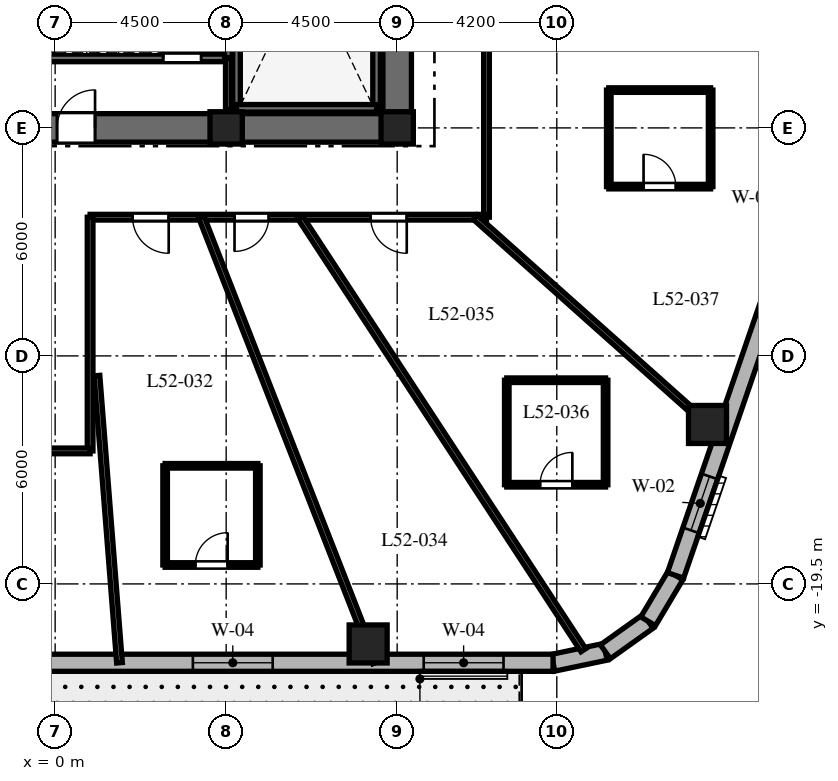
"""IFC4 building model, lengths in metres.
Left out: names, types, materials, properties, quantities, classifications, styles, units other than length and angle.
Written with IfcOpenShell. Run it as: python <this file> out.ifc"""

import sys

from ifc_helpers import new_model, si_unit, direction, frame, frame_2d, origin, origin_2d, place, context, subcontext, project, spatial, rectangle, extrude, element, fill, save


model = new_model("IFC4")
c1 = context("Model", 3, precision=1e-05, world=origin(), true_north=direction((0.0, 1.0)))
c2 = subcontext(c1, "Body", "Model", "MODEL_VIEW")
j1 = project(units=[si_unit("LENGTHUNIT", "METRE"), si_unit("PLANEANGLEUNIT", "RADIAN")], contexts=[c1])
p1 = place(None, origin())
s1 = spatial("IfcSite", under=j1, at=p1, CompositionType="ELEMENT")
p2 = place(p1, origin())
s2 = spatial("IfcBuilding", under=s1, at=p2, CompositionType="ELEMENT")
p3 = place(p2, frame((0.0, 0.0, 210.3)))
s3 = spatial("IfcBuildingStorey", under=s2, at=p3, CompositionType="ELEMENT", Elevation=210.3)
p4 = place(p3, frame((-9.375, -7.5, 0.0), z_axis=(0.0, 0.0, 1.0), x_axis=(1.0, 0.0, 0.0)))
e1 = element("IfcWall", 1, at=p4, inside=s3, PredefinedType="SHEAR", context=c2, shape_type="SweptSolid", body=[
    extrude(rectangle(XDim=18.75, YDim=0.75, at=frame_2d((9.375, 0.0))), origin(), (0.0, 0.0, 1.0), 3.8),
])
p5 = place(p4, frame((9.425, 0.0, 0.0)))
e2 = element("IfcOpeningElement", 2, at=p5, cuts=e1, PredefinedType="OPENING", context=c2, shape_type="SweptSolid", body=[
    extrude(rectangle(XDim=1.0, YDim=2.15, at=frame_2d((0.5, 1.075))), frame((0.0, 0.385, 0.0), z_axis=(0.0, -1.0, 0.0), x_axis=(1.0, 0.0, 0.0)), (0.0, 0.0, 1.0), 0.77),
])
p6 = place(p3, frame((9.0, -7.125, 0.0), z_axis=(0.0, 0.0, 1.0), x_axis=(0.0, 1.0, 0.0)))
e3 = element("IfcWall", 3, at=p6, inside=s3, PredefinedType="SHEAR", context=c2, shape_type="SweptSolid", body=[
    extrude(rectangle(XDim=14.25, YDim=0.75, at=frame_2d((7.125, 0.0))), origin(), (0.0, 0.0, 1.0), 3.8),
])
p7 = place(p6, frame((10.25, 0.0, 0.0)))
e4 = element("IfcOpeningElement", 4, at=p7, cuts=e3, PredefinedType="OPENING", context=c2, shape_type="SweptSolid", body=[
    extrude(rectangle(XDim=1.05, YDim=2.15, at=frame_2d((0.525, 1.075))), frame((0.0, 0.385, 0.0), z_axis=(0.0, -1.0, 0.0), x_axis=(1.0, 0.0, 0.0)), (0.0, 0.0, 1.0), 0.77),
])
for number, where, z_axis, x_axis in (
    (5, (4.772, -6.985, 0.0), (0.0, 0.0, 1.0), (0.0, 1.0, 0.0)),
    (6, (8.458, -6.985, 0.0), (0.0, 0.0, 1.0), (0.0, 1.0, 0.0)),
):
    element("IfcWall", number, at=place(p3, frame(where, z_axis=z_axis, x_axis=x_axis)), inside=s3, PredefinedType="SHEAR", context=c2, shape_type="SweptSolid", body=[
        extrude(rectangle(XDim=9.143, YDim=0.2, at=frame_2d((4.572, 0.0))), origin(), (0.0, 0.0, 1.0), 3.8),
    ])
p8 = place(p3, frame((4.772, -6.985, 0.0), z_axis=(0.0, 0.0, 1.0), x_axis=(1.0, 0.0, 0.0)))
e7 = element("IfcWall", 7, at=p8, inside=s3, PredefinedType="SHEAR", context=c2, shape_type="SweptSolid", body=[
    extrude(rectangle(XDim=3.686, YDim=0.2, at=frame_2d((1.843, 0.0))), origin(), (0.0, 0.0, 1.0), 3.8),
])
p9 = place(p3, frame((-4.608, -5.658, 0.0), z_axis=(0.0, 0.0, 1.0), x_axis=(1.0, 0.0, 0.0)))
e8 = element("IfcWall", 8, at=p9, inside=s3, PredefinedType="SHEAR", context=c2, shape_type="SweptSolid", body=[
    extrude(rectangle(XDim=9.166, YDim=0.2, at=frame_2d((4.583, 0.0))), origin(), (0.0, 0.0, 1.0), 3.8),
])
p10 = place(p9, frame((7.45, 0.0, 0.0)))
e9 = element("IfcOpeningElement", 9, at=p10, cuts=e8, PredefinedType="OPENING", context=c2, shape_type="SweptSolid", body=[
    extrude(rectangle(XDim=1.0, YDim=2.15, at=frame_2d((0.5, 1.075))), frame((0.0, 0.11, 0.0), z_axis=(0.0, -1.0, 0.0), x_axis=(1.0, 0.0, 0.0)), (0.0, 0.0, 1.0), 0.22),
])
p11 = place(p3, frame((4.558, -5.658, 0.0), z_axis=(0.0, 0.0, 1.0), x_axis=(0.0, 1.0, 0.0)))
e10 = element("IfcWall", 10, at=p11, inside=s3, PredefinedType="SHEAR", context=c2, shape_type="SweptSolid", body=[
    extrude(rectangle(XDim=3.686, YDim=0.2, at=frame_2d((1.843, 0.0))), origin(), (0.0, 0.0, 1.0), 3.8),
])
for number, where, z_axis, x_axis in (
    (11, (4.5, -7.5, 0.0), (0.0, 0.0, 1.0), (1.0, 0.0, 0.0)),
    (12, (9.0, -7.5, 0.0), (0.0, 0.0, 1.0), (1.0, 0.0, 0.0)),
):
    element("IfcColumn", number, at=place(p3, frame(where, z_axis=z_axis, x_axis=x_axis)), inside=s3, PredefinedType="COLUMN", context=c2, shape_type="SweptSolid", body=[
        extrude(rectangle(XDim=0.85, YDim=0.85, at=origin_2d()), origin(), (0.0, 0.0, 1.0), 3.8),
    ])
for number, where, z_axis, x_axis in (
    (13, (8.236, -21.08, 0.0), (0.0, 0.0, 1.0), (1.0, 0.0, 0.0)),
    (14, (17.166, -15.304, 0.0), (0.0, 0.0, 1.0), (1.0, 0.0, 0.0)),
):
    element("IfcColumn", number, at=place(p3, frame(where, z_axis=z_axis, x_axis=x_axis)), inside=s3, PredefinedType="COLUMN", context=c2, shape_type="SweptSolid", body=[
        extrude(rectangle(XDim=1.0, YDim=1.0, at=origin_2d()), origin(), (0.0, 0.0, 1.0), 3.8),
    ])
p12 = place(p3, frame((13.102, -21.575, 0.0), z_axis=(0.0, 0.0, 1.0), x_axis=(0.978757421505, 0.205021730188, 0.0)))
e15 = element("IfcWall", 15, at=p12, inside=s3, PredefinedType="SOLIDWALL", context=c2, shape_type="SweptSolid", body=[
    extrude(rectangle(XDim=1.406, YDim=0.45, at=frame_2d((0.703, 0.0))), origin(), (0.0, 0.0, 1.0), 3.5),
])
p13 = place(p3, frame((14.478, -21.287, 0.0), z_axis=(0.0, 0.0, 1.0), x_axis=(0.813888518617, 0.58102106611, 0.0)))
e16 = element("IfcWall", 16, at=p13, inside=s3, PredefinedType="SOLIDWALL", context=c2, shape_type="SweptSolid", body=[
    extrude(rectangle(XDim=1.383, YDim=0.45, at=frame_2d((0.691, 0.0))), origin(), (0.0, 0.0, 1.0), 3.5),
])
p14 = place(p3, frame((15.604, -20.483, 0.0), z_axis=(0.0, 0.0, 1.0), x_axis=(0.512222149036, 0.858852996756, 0.0)))
e17 = element("IfcWall", 17, at=p14, inside=s3, PredefinedType="SOLIDWALL", context=c2, shape_type="SweptSolid", body=[
    extrude(rectangle(XDim=1.406, YDim=0.45, at=frame_2d((0.703, 0.0))), origin(), (0.0, 0.0, 1.0), 3.5),
])
p15 = place(p3, frame((-11.298, -21.575, 0.0), z_axis=(0.0, 0.0, 1.0), x_axis=(1.0, 0.0, 0.0)))
e18 = element("IfcWall", 18, at=p15, inside=s3, PredefinedType="SOLIDWALL", context=c2, shape_type="SweptSolid", body=[
    extrude(rectangle(XDim=24.399, YDim=0.45, at=frame_2d((12.2, 0.0))), origin(), (0.0, 0.0, 1.0), 3.5),
])
p16 = place(p15, frame((2.55, 0.0, 0.0)))
e19 = element("IfcOpeningElement", 19, at=p16, cuts=e18, PredefinedType="OPENING", context=c2, shape_type="SweptSolid", body=[
    extrude(rectangle(XDim=1.0, YDim=2.15, at=frame_2d((0.5, 1.075))), frame((0.0, 0.235, 0.0), z_axis=(0.0, -1.0, 0.0), x_axis=(1.0, 0.0, 0.0)), (0.0, 0.0, 1.0), 0.47),
])
p17 = place(p15, frame((8.169, 0.0, 0.8)))
e20 = element("IfcOpeningElement", 20, at=p17, cuts=e18, PredefinedType="OPENING", context=c2, shape_type="SweptSolid", body=[
    extrude(rectangle(XDim=2.1, YDim=1.85, at=frame_2d((1.05, 0.925))), frame((0.0, 0.235, 0.0), z_axis=(0.0, -1.0, 0.0), x_axis=(1.0, 0.0, 0.0)), (0.0, 0.0, 1.0), 0.47),
])
p18 = place(p15, frame((14.922, 0.0, 0.8)))
e21 = element("IfcOpeningElement", 21, at=p18, cuts=e18, PredefinedType="OPENING", context=c2, shape_type="SweptSolid", body=[
    extrude(rectangle(XDim=2.1, YDim=1.85, at=frame_2d((1.05, 0.925))), frame((0.0, 0.235, 0.0), z_axis=(0.0, -1.0, 0.0), x_axis=(1.0, 0.0, 0.0)), (0.0, 0.0, 1.0), 0.47),
])
p19 = place(p15, frame((20.996, 0.0, 0.8)))
e22 = element("IfcOpeningElement", 22, at=p19, cuts=e18, PredefinedType="OPENING", context=c2, shape_type="SweptSolid", body=[
    extrude(rectangle(XDim=2.1, YDim=1.85, at=frame_2d((1.05, 0.925))), frame((0.0, 0.235, 0.0), z_axis=(0.0, -1.0, 0.0), x_axis=(1.0, 0.0, 0.0)), (0.0, 0.0, 1.0), 0.47),
])
p20 = place(p3, frame((16.324, -19.275, 0.0), z_axis=(0.0, 0.0, 1.0), x_axis=(0.325083142304, 0.945685439557, 0.0)))
e23 = element("IfcWall", 23, at=p20, inside=s3, PredefinedType="SOLIDWALL", context=c2, shape_type="SweptSolid", body=[
    extrude(rectangle(XDim=20.224, YDim=0.45, at=frame_2d((10.112, 0.0))), origin(), (0.0, 0.0, 1.0), 3.5),
])
p21 = place(p20, frame((1.253, 0.0, 0.8)))
e24 = element("IfcOpeningElement", 24, at=p21, cuts=e23, PredefinedType="OPENING", context=c2, shape_type="SweptSolid", body=[
    extrude(rectangle(XDim=1.5, YDim=1.8, at=frame_2d((0.75, 0.9))), frame((0.0, 0.235, 0.0), z_axis=(0.0, -1.0, 0.0), x_axis=(1.0, 0.0, 0.0)), (0.0, 0.0, 1.0), 0.47),
])
p22 = place(p20, frame((9.309, 0.0, 0.8)))
e25 = element("IfcOpeningElement", 25, at=p22, cuts=e23, PredefinedType="OPENING", context=c2, shape_type="SweptSolid", body=[
    extrude(rectangle(XDim=1.5, YDim=1.8, at=frame_2d((0.75, 0.9))), frame((0.0, 0.235, 0.0), z_axis=(0.0, -1.0, 0.0), x_axis=(1.0, 0.0, 0.0)), (0.0, 0.0, 1.0), 0.47),
])
p23 = place(p20, frame((17.418, 0.0, 0.8)))
e26 = element("IfcOpeningElement", 26, at=p23, cuts=e23, PredefinedType="OPENING", context=c2, shape_type="SweptSolid", body=[
    extrude(rectangle(XDim=1.5, YDim=1.8, at=frame_2d((0.75, 0.9))), frame((0.0, 0.235, 0.0), z_axis=(0.0, -1.0, 0.0), x_axis=(1.0, 0.0, 0.0)), (0.0, 0.0, 1.0), 0.47),
])
p24 = place(p3, frame((4.558, -7.02, 0.0), z_axis=(0.0, 0.0, 1.0), x_axis=(0.0, 1.0, 0.0)))
e27 = element("IfcWall", 27, at=p24, inside=s3, PredefinedType="PARTITIONING", context=c2, shape_type="SweptSolid", body=[
    extrude(rectangle(XDim=1.362, YDim=0.15, at=frame_2d((0.681, 0.0))), origin(), (0.0, 0.0, 1.0), 3.5),
])
p25 = place(p3, frame((11.35, -4.4, 0.0), z_axis=(0.0, 0.0, 1.0), x_axis=(0.0, -1.0, 0.0)))
e28 = element("IfcWall", 28, at=p25, inside=s3, PredefinedType="PARTITIONING", context=c2, shape_type="SweptSolid", body=[
    extrude(rectangle(XDim=5.45, YDim=0.15, at=frame_2d((2.725, 0.0))), origin(), (0.0, 0.0, 1.0), 2.99),
])
p26 = place(p3, frame((11.35, -9.85, 0.0), z_axis=(0.0, 0.0, 1.0), x_axis=(-1.0, 0.0, 0.0)))
e29 = element("IfcWall", 29, at=p26, inside=s3, PredefinedType="PARTITIONING", context=c2, shape_type="SweptSolid", body=[
    extrude(rectangle(XDim=10.43, YDim=0.15, at=frame_2d((5.215, 0.0))), origin(), (0.0, 0.0, 1.0), 2.99),
])
p27 = place(p26, frame((8.362, 0.0, 0.0)))
e30 = element("IfcOpeningElement", 30, at=p27, cuts=e29, PredefinedType="OPENING", context=c2, shape_type="SweptSolid", body=[
    extrude(rectangle(XDim=0.95, YDim=2.03, at=frame_2d((0.475, 1.015))), frame((0.0, 0.085, 0.0), z_axis=(0.0, -1.0, 0.0), x_axis=(1.0, 0.0, 0.0)), (0.0, 0.0, 1.0), 0.17),
])
p28 = place(p26, frame((5.73, 0.0, 0.0)))
e31 = element("IfcOpeningElement", 31, at=p28, cuts=e29, PredefinedType="OPENING", context=c2, shape_type="SweptSolid", body=[
    extrude(rectangle(XDim=0.9, YDim=2.03, at=frame_2d((0.45, 1.015))), frame((0.0, 0.085, 0.0), z_axis=(0.0, -1.0, 0.0), x_axis=(1.0, 0.0, 0.0)), (0.0, 0.0, 1.0), 0.17),
])
p29 = place(p26, frame((2.098, 0.0, 0.0)))
e32 = element("IfcOpeningElement", 32, at=p29, cuts=e29, PredefinedType="OPENING", context=c2, shape_type="SweptSolid", body=[
    extrude(rectangle(XDim=0.95, YDim=2.03, at=frame_2d((0.475, 1.015))), frame((0.0, 0.085, 0.0), z_axis=(0.0, -1.0, 0.0), x_axis=(1.0, 0.0, 0.0)), (0.0, 0.0, 1.0), 0.17),
])
p30 = place(p3, frame((0.92, -9.85, 0.0), z_axis=(0.0, 0.0, 1.0), x_axis=(0.0, -1.0, 0.0)))
e33 = element("IfcWall", 33, at=p30, inside=s3, PredefinedType="PARTITIONING", context=c2, shape_type="SweptSolid", body=[
    extrude(rectangle(XDim=6.15, YDim=0.15, at=frame_2d((3.075, 0.0))), origin(), (0.0, 0.0, 1.0), 3.026),
])
p31 = place(p3, frame((0.92, -16.0, 0.0), z_axis=(0.0, 0.0, 1.0), x_axis=(-1.0, 0.0, 0.0)))
e34 = element("IfcWall", 34, at=p31, inside=s3, PredefinedType="PARTITIONING", context=c2, shape_type="SweptSolid", body=[
    extrude(rectangle(XDim=1.84, YDim=0.15, at=frame_2d((0.92, 0.0))), origin(), (0.0, 0.0, 1.0), 3.5),
])
p32 = place(p3, frame((1.1, -14.018, 0.0), z_axis=(0.0, 0.0, 1.0), x_axis=(0.078228275349, -0.996935472804, 0.0)))
e35 = element("IfcWall", 35, at=p32, inside=s3, PredefinedType="PARTITIONING", context=c2, shape_type="SweptSolid", body=[
    extrude(rectangle(XDim=7.581, YDim=0.15, at=frame_2d((3.79, 0.0))), origin(), (0.0, 0.0, 1.0), 2.74),
])
p33 = place(p3, frame((3.848, -9.85, 0.0), z_axis=(0.0, 0.0, 1.0), x_axis=(0.363921778212, -0.931429513889, 0.0)))
e36 = element("IfcWall", 36, at=p33, inside=s3, PredefinedType="PARTITIONING", context=c2, shape_type="SweptSolid", body=[
    extrude(rectangle(XDim=12.588, YDim=0.15, at=frame_2d((6.294, 0.0))), origin(), (0.0, 0.0, 1.0), 2.74),
])
p34 = place(p3, frame((6.444, -9.85, 0.0), z_axis=(0.0, 0.0, 1.0), x_axis=(0.547492333129, -0.836810698525, 0.0)))
e37 = element("IfcWall", 37, at=p34, inside=s3, PredefinedType="PARTITIONING", context=c2, shape_type="SweptSolid", body=[
    extrude(rectangle(XDim=13.616, YDim=0.15, at=frame_2d((6.808, 0.0))), origin(), (0.0, 0.0, 1.0), 2.74),
])
p35 = place(p3, frame((11.048, -9.85, 0.0), z_axis=(0.0, 0.0, 1.0), x_axis=(0.746444434655, -0.665447748492, 0.0)))
e38 = element("IfcWall", 38, at=p35, inside=s3, PredefinedType="PARTITIONING", context=c2, shape_type="SweptSolid", body=[
    extrude(rectangle(XDim=8.732, YDim=0.15, at=frame_2d((4.366, 0.0))), origin(), (0.0, 0.0, 1.0), 2.74),
])
p36 = place(p3, frame((2.894, -19.002, 0.0), z_axis=(0.0, 0.0, 1.0), x_axis=(1.0, 0.0, 0.0)))
e39 = element("IfcWall", 39, at=p36, inside=s3, PredefinedType="PARTITIONING", context=c2, shape_type="SweptSolid", body=[
    extrude(rectangle(XDim=2.44, YDim=0.12, at=frame_2d((1.22, 0.0))), origin(), (0.0, 0.0, 1.0), 3.5),
])
p37 = place(p36, frame((0.795, 0.0, 0.0)))
e40 = element("IfcOpeningElement", 40, at=p37, cuts=e39, PredefinedType="OPENING", context=c2, shape_type="SweptSolid", body=[
    extrude(rectangle(XDim=0.85, YDim=2.03, at=frame_2d((0.425, 1.015))), frame((0.0, 0.07, 0.0), z_axis=(0.0, -1.0, 0.0), x_axis=(1.0, 0.0, 0.0)), (0.0, 0.0, 1.0), 0.14),
])
p38 = place(p3, frame((5.334, -19.002, 0.0), z_axis=(0.0, 0.0, 1.0), x_axis=(0.0, 1.0, 0.0)))
e41 = element("IfcWall", 41, at=p38, inside=s3, PredefinedType="PARTITIONING", context=c2, shape_type="SweptSolid", body=[
    extrude(rectangle(XDim=2.61, YDim=0.12, at=frame_2d((1.305, 0.0))), origin(), (0.0, 0.0, 1.0), 2.94),
])
p39 = place(p3, frame((5.334, -16.392, 0.0), z_axis=(0.0, 0.0, 1.0), x_axis=(-1.0, 0.0, 0.0)))
e42 = element("IfcWall", 42, at=p39, inside=s3, PredefinedType="PARTITIONING", context=c2, shape_type="SweptSolid", body=[
    extrude(rectangle(XDim=2.44, YDim=0.12, at=frame_2d((1.22, 0.0))), origin(), (0.0, 0.0, 1.0), 3.5),
])
p40 = place(p3, frame((2.894, -16.392, 0.0), z_axis=(0.0, 0.0, 1.0), x_axis=(0.0, -1.0, 0.0)))
e43 = element("IfcWall", 43, at=p40, inside=s3, PredefinedType="PARTITIONING", context=c2, shape_type="SweptSolid", body=[
    extrude(rectangle(XDim=2.61, YDim=0.12, at=frame_2d((1.305, 0.0))), origin(), (0.0, 0.0, 1.0), 2.94),
])
p41 = place(p3, frame((11.884, -16.89, 0.0), z_axis=(0.0, 0.0, 1.0), x_axis=(1.0, 0.0, 0.0)))
e44 = element("IfcWall", 44, at=p41, inside=s3, PredefinedType="PARTITIONING", context=c2, shape_type="SweptSolid", body=[
    extrude(rectangle(XDim=2.6, YDim=0.12, at=frame_2d((1.3, 0.0))), origin(), (0.0, 0.0, 1.0), 2.74),
])
p42 = place(p41, frame((0.875, 0.0, 0.0)))
e45 = element("IfcOpeningElement", 45, at=p42, cuts=e44, PredefinedType="OPENING", context=c2, shape_type="SweptSolid", body=[
    extrude(rectangle(XDim=0.85, YDim=2.03, at=frame_2d((0.425, 1.015))), frame((0.0, 0.07, 0.0), z_axis=(0.0, -1.0, 0.0), x_axis=(1.0, 0.0, 0.0)), (0.0, 0.0, 1.0), 0.14),
])
p43 = place(p3, frame((14.484, -16.89, 0.0), z_axis=(0.0, 0.0, 1.0), x_axis=(0.0, 1.0, 0.0)))
e46 = element("IfcWall", 46, at=p43, inside=s3, PredefinedType="PARTITIONING", context=c2, shape_type="SweptSolid", body=[
    extrude(rectangle(XDim=2.75, YDim=0.12, at=frame_2d((1.375, 0.0))), origin(), (0.0, 0.0, 1.0), 2.74),
])
p44 = place(p3, frame((14.484, -14.14, 0.0), z_axis=(0.0, 0.0, 1.0), x_axis=(-1.0, 0.0, 0.0)))
e47 = element("IfcWall", 47, at=p44, inside=s3, PredefinedType="PARTITIONING", context=c2, shape_type="SweptSolid", body=[
    extrude(rectangle(XDim=2.6, YDim=0.12, at=frame_2d((1.3, 0.0))), origin(), (0.0, 0.0, 1.0), 3.026),
])
p45 = place(p3, frame((11.884, -14.14, 0.0), z_axis=(0.0, 0.0, 1.0), x_axis=(0.0, -1.0, 0.0)))
e48 = element("IfcWall", 48, at=p45, inside=s3, PredefinedType="PARTITIONING", context=c2, shape_type="SweptSolid", body=[
    extrude(rectangle(XDim=2.75, YDim=0.12, at=frame_2d((1.375, 0.0))), origin(), (0.0, 0.0, 1.0), 3.026),
])
p46 = place(p3, frame((14.568, -9.045, 0.0), z_axis=(0.0, 0.0, 1.0), x_axis=(1.0, 0.0, 0.0)))
e49 = element("IfcWall", 49, at=p46, inside=s3, PredefinedType="PARTITIONING", context=c2, shape_type="SweptSolid", body=[
    extrude(rectangle(XDim=2.68, YDim=0.12, at=frame_2d((1.34, 0.0))), origin(), (0.0, 0.0, 1.0), 3.072),
])
p47 = place(p46, frame((0.915, 0.0, 0.0)))
e50 = element("IfcOpeningElement", 50, at=p47, cuts=e49, PredefinedType="OPENING", context=c2, shape_type="SweptSolid", body=[
    extrude(rectangle(XDim=0.85, YDim=2.03, at=frame_2d((0.425, 1.015))), frame((0.0, 0.07, 0.0), z_axis=(0.0, -1.0, 0.0), x_axis=(1.0, 0.0, 0.0)), (0.0, 0.0, 1.0), 0.14),
])
p48 = place(p3, frame((17.248, -9.045, 0.0), z_axis=(0.0, 0.0, 1.0), x_axis=(0.0, 1.0, 0.0)))
e51 = element("IfcWall", 51, at=p48, inside=s3, PredefinedType="PARTITIONING", context=c2, shape_type="SweptSolid", body=[
    extrude(rectangle(XDim=2.54, YDim=0.12, at=frame_2d((1.27, 0.0))), origin(), (0.0, 0.0, 1.0), 3.5),
])
p49 = place(p3, frame((17.248, -6.505, 0.0), z_axis=(0.0, 0.0, 1.0), x_axis=(-1.0, 0.0, 0.0)))
e52 = element("IfcWall", 52, at=p49, inside=s3, PredefinedType="PARTITIONING", context=c2, shape_type="SweptSolid", body=[
    extrude(rectangle(XDim=2.68, YDim=0.12, at=frame_2d((1.34, 0.0))), origin(), (0.0, 0.0, 1.0), 3.072),
])
p50 = place(p3, frame((14.568, -6.505, 0.0), z_axis=(0.0, 0.0, 1.0), x_axis=(0.0, -1.0, 0.0)))
e53 = element("IfcWall", 53, at=p50, inside=s3, PredefinedType="PARTITIONING", context=c2, shape_type="SweptSolid", body=[
    extrude(rectangle(XDim=2.54, YDim=0.12, at=frame_2d((1.27, 0.0))), origin(), (0.0, 0.0, 1.0), 3.5),
])
p51 = place(p18, origin())
e54 = element("IfcWindow", 54, at=p51, inside=s3, PartitioningType="SINGLE_PANEL", PredefinedType="WINDOW", context=c2, shape_type="SweptSolid", body=[
    extrude(rectangle(XDim=2.1, YDim=1.85, at=frame_2d((1.05, 0.925))), frame((0.0, 0.03, 0.0), z_axis=(0.0, -1.0, 0.0), x_axis=(1.0, 0.0, 0.0)), (0.0, 0.0, 1.0), 0.06),
])
fill(e21, e54)
p52 = place(p19, origin())
e55 = element("IfcWindow", 55, at=p52, inside=s3, PartitioningType="SINGLE_PANEL", PredefinedType="WINDOW", context=c2, shape_type="SweptSolid", body=[
    extrude(rectangle(XDim=2.1, YDim=1.85, at=frame_2d((1.05, 0.925))), frame((0.0, 0.03, 0.0), z_axis=(0.0, -1.0, 0.0), x_axis=(1.0, 0.0, 0.0)), (0.0, 0.0, 1.0), 0.06),
])
fill(e22, e55)
p53 = place(p21, origin())
e56 = element("IfcWindow", 56, at=p53, inside=s3, PartitioningType="SINGLE_PANEL", PredefinedType="WINDOW", context=c2, shape_type="SweptSolid", body=[
    extrude(rectangle(XDim=1.5, YDim=1.8, at=frame_2d((0.75, 0.9))), frame((0.0, 0.03, 0.0), z_axis=(0.0, -1.0, 0.0), x_axis=(1.0, 0.0, 0.0)), (0.0, 0.0, 1.0), 0.06),
])
fill(e24, e56)
p54 = place(p10, origin())
e57 = element("IfcDoor", 57, at=p54, inside=s3, OperationType="SINGLE_SWING_LEFT", PredefinedType="DOOR", context=c2, shape_type="SweptSolid", body=[
    extrude(rectangle(XDim=1.0, YDim=2.15, at=frame_2d((0.5, 1.075))), frame((0.0, 0.025, 0.0), z_axis=(0.0, -1.0, 0.0), x_axis=(1.0, 0.0, 0.0)), (0.0, 0.0, 1.0), 0.05),
])
fill(e9, e57)
p55 = place(p5, origin())
e58 = element("IfcDoor", 58, at=p55, inside=s3, OperationType="SINGLE_SWING_RIGHT", PredefinedType="DOOR", context=c2, shape_type="SweptSolid", body=[
    extrude(rectangle(XDim=1.0, YDim=2.15, at=frame_2d((0.5, 1.075))), frame((0.0, 0.025, 0.0), z_axis=(0.0, -1.0, 0.0), x_axis=(1.0, 0.0, 0.0)), (0.0, 0.0, 1.0), 0.05),
])
fill(e2, e58)
p56 = place(p27, origin())
e59 = element("IfcDoor", 59, at=p56, inside=s3, OperationType="SINGLE_SWING_LEFT", PredefinedType="DOOR", context=c2, shape_type="SweptSolid", body=[
    extrude(rectangle(XDim=0.95, YDim=2.03, at=frame_2d((0.475, 1.015))), frame((0.0, 0.025, 0.0), z_axis=(0.0, -1.0, 0.0), x_axis=(1.0, 0.0, 0.0)), (0.0, 0.0, 1.0), 0.05),
])
fill(e30, e59)
p57 = place(p37, origin())
e60 = element("IfcDoor", 60, at=p57, inside=s3, OperationType="SINGLE_SWING_RIGHT", PredefinedType="DOOR", context=c2, shape_type="SweptSolid", body=[
    extrude(rectangle(XDim=0.85, YDim=2.03, at=frame_2d((0.425, 1.015))), frame((0.0, 0.025, 0.0), z_axis=(0.0, -1.0, 0.0), x_axis=(1.0, 0.0, 0.0)), (0.0, 0.0, 1.0), 0.05),
])
fill(e40, e60)
p58 = place(p28, origin())
e61 = element("IfcDoor", 61, at=p58, inside=s3, OperationType="SINGLE_SWING_RIGHT", PredefinedType="DOOR", context=c2, shape_type="SweptSolid", body=[
    extrude(rectangle(XDim=0.9, YDim=2.03, at=frame_2d((0.45, 1.015))), frame((0.0, 0.025, 0.0), z_axis=(0.0, -1.0, 0.0), x_axis=(1.0, 0.0, 0.0)), (0.0, 0.0, 1.0), 0.05),
])
fill(e31, e61)
p59 = place(p29, origin())
e62 = element("IfcDoor", 62, at=p59, inside=s3, OperationType="SINGLE_SWING_LEFT", PredefinedType="DOOR", context=c2, shape_type="SweptSolid", body=[
    extrude(rectangle(XDim=0.95, YDim=2.03, at=frame_2d((0.475, 1.015))), frame((0.0, 0.025, 0.0), z_axis=(0.0, -1.0, 0.0), x_axis=(1.0, 0.0, 0.0)), (0.0, 0.0, 1.0), 0.05),
])
fill(e32, e62)
p60 = place(p42, origin())
e63 = element("IfcDoor", 63, at=p60, inside=s3, OperationType="SINGLE_SWING_RIGHT", PredefinedType="DOOR", context=c2, shape_type="SweptSolid", body=[
    extrude(rectangle(XDim=0.85, YDim=2.03, at=frame_2d((0.425, 1.015))), frame((0.0, 0.025, 0.0), z_axis=(0.0, -1.0, 0.0), x_axis=(1.0, 0.0, 0.0)), (0.0, 0.0, 1.0), 0.05),
])
fill(e45, e63)
p61 = place(p47, origin())
e64 = element("IfcDoor", 64, at=p61, inside=s3, OperationType="SINGLE_SWING_LEFT", PredefinedType="DOOR", context=c2, shape_type="SweptSolid", body=[
    extrude(rectangle(XDim=0.85, YDim=2.03, at=frame_2d((0.425, 1.015))), frame((0.0, 0.025, 0.0), z_axis=(0.0, -1.0, 0.0), x_axis=(1.0, 0.0, 0.0)), (0.0, 0.0, 1.0), 0.05),
])
fill(e50, e64)
save(model, sys.argv[1])
